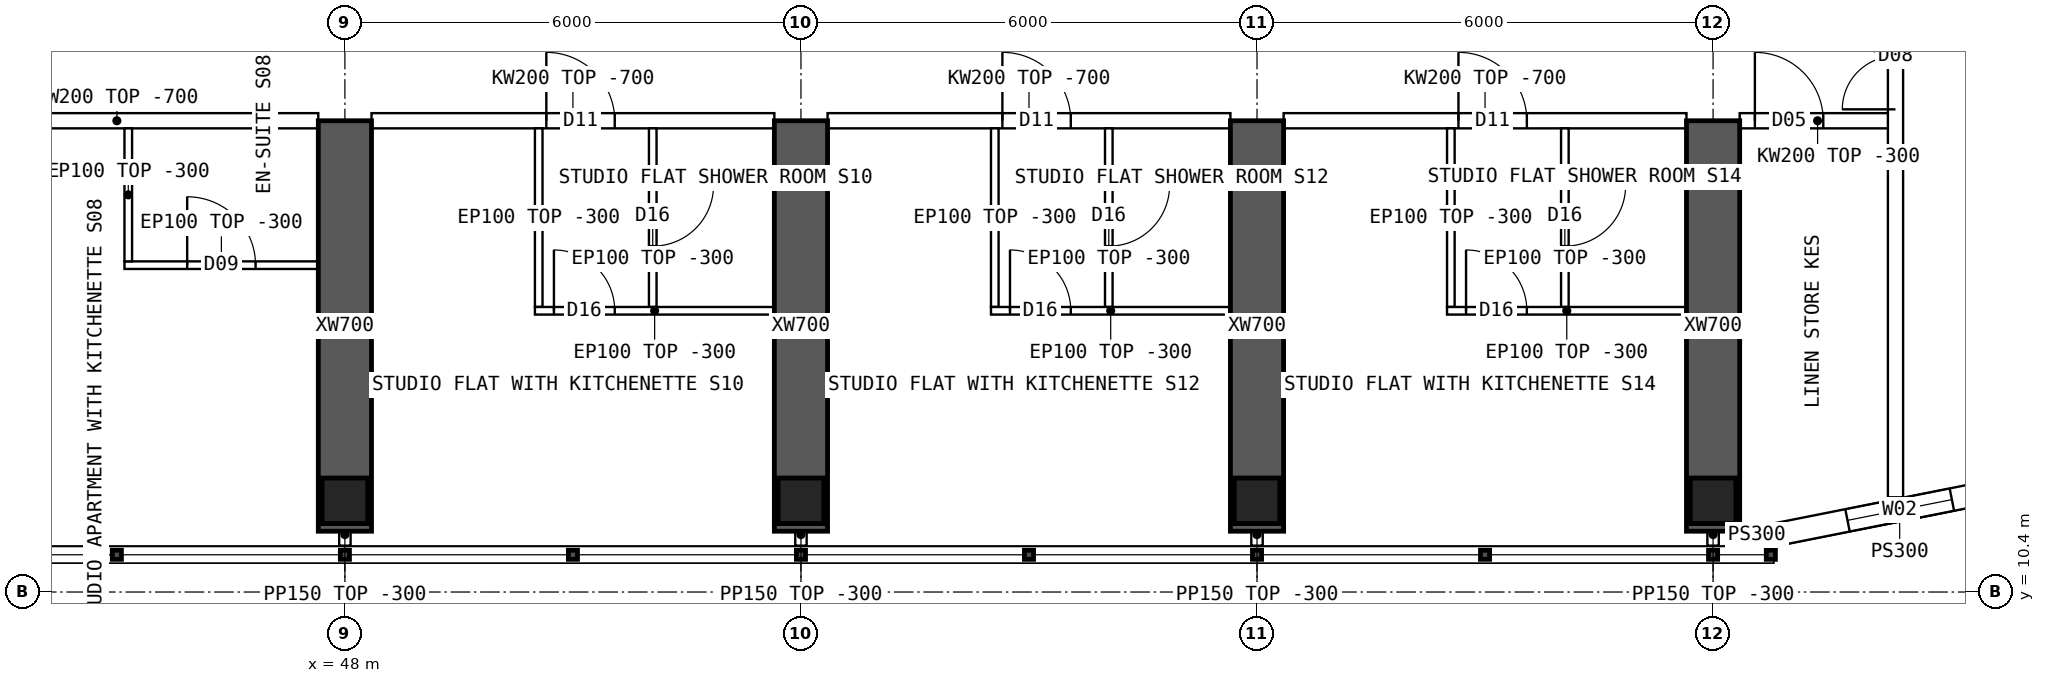
"""IFC4 building model, lengths in metres.
Left out: names, types, materials, properties, quantities, classifications, styles, units other than length and angle.
Written with IfcOpenShell. Run it as: python <this file> out.ifc"""

import sys

from ifc_helpers import new_model, si_unit, direction, frame, frame_2d, origin, origin_2d, place, context, subcontext, project, spatial, polyline, rectangle, hollow_rectangle, outline, extrude, element, fill, save


model = new_model("IFC4")
c1 = context("Model", 3, precision=1e-05, world=origin(), true_north=direction((0.0, 1.0)))
c2 = subcontext(c1, "Body", "Model", "MODEL_VIEW")
j1 = project(units=[si_unit("LENGTHUNIT", "METRE"), si_unit("PLANEANGLEUNIT", "RADIAN")], contexts=[c1])
p1 = place(None, origin())
s1 = spatial("IfcSite", under=j1, at=p1, CompositionType="ELEMENT")
p2 = place(p1, origin())
s2 = spatial("IfcBuilding", under=s1, at=p2, CompositionType="ELEMENT")
p3 = place(p2, frame((0.0, 0.0, 254.05)))
s3 = spatial("IfcBuildingStorey", under=s2, at=p3, CompositionType="ELEMENT", Elevation=254.05)
for number, where, z_axis, x_axis in (
    (1, (48.0, 11.6, 0.0), (0.0, 0.0, 1.0), (1.0, 0.0, 0.0)),
    (2, (54.0, 11.6, 0.0), (0.0, 0.0, 1.0), (1.0, 0.0, 0.0)),
    (3, (60.0, 11.6, 0.0), (0.0, 0.0, 1.0), (1.0, 0.0, 0.0)),
    (4, (66.0, 11.6, 0.0), (0.0, 0.0, 1.0), (1.0, 0.0, 0.0)),
):
    element("IfcColumn", number, at=place(p3, frame(where, z_axis=z_axis, x_axis=x_axis)), inside=s3, PredefinedType="COLUMN", context=c2, shape_type="SweptSolid", body=[
        extrude(hollow_rectangle(XDim=0.6, YDim=0.6, WallThickness=0.06, at=origin_2d()), origin(), (0.0, 0.0, 1.0), 3.75),
    ])
for number, where, z_axis, x_axis in (
    (5, (48.0, 11.2, 0.0), (0.0, 0.0, 1.0), (0.0, 1.0, 0.0)),
    (6, (54.0, 11.2, 0.0), (0.0, 0.0, 1.0), (0.0, 1.0, 0.0)),
    (7, (60.0, 11.2, 0.0), (0.0, 0.0, 1.0), (0.0, 1.0, 0.0)),
    (8, (66.0, 11.2, 0.0), (0.0, 0.0, 1.0), (0.0, 1.0, 0.0)),
):
    element("IfcWall", number, at=place(p3, frame(where, z_axis=z_axis, x_axis=x_axis)), inside=s3, PredefinedType="SHEAR", context=c2, shape_type="SweptSolid", body=[
        extrude(rectangle(XDim=5.4, YDim=0.7, at=frame_2d((2.7, 0.0))), origin(), (0.0, 0.0, 1.0), 3.75),
    ])
p4 = place(p3, frame((66.8, 11.15, 0.0), z_axis=(0.0, 0.0, 1.0), x_axis=(0.98078325777, 0.195100490205, 0.0)))
e9 = element("IfcWall", 9, at=p4, inside=s3, PredefinedType="SOLIDWALL", context=c2, shape_type="SweptSolid", body=[
    extrude(outline(polyline([(-0.03, -0.15), (3.405, -0.15), (3.345, 0.15), (0.03, 0.15), (-0.03, -0.15)])), origin(), (0.0, 0.0, 1.0), 3.45),
])
p5 = place(p4, frame((0.988, 0.0, 0.9)))
e10 = element("IfcOpeningElement", 10, at=p5, cuts=e9, PredefinedType="OPENING", context=c2, shape_type="SweptSolid", body=[
    extrude(rectangle(XDim=1.4, YDim=1.8, at=frame_2d((0.7, 0.9))), frame((0.0, 0.16, 0.0), z_axis=(0.0, -1.0, 0.0), x_axis=(1.0, 0.0, 0.0)), (0.0, 0.0, 1.0), 0.32),
])
p6 = place(p3, frame((66.8, 11.15, 0.0), z_axis=(0.0, 0.0, 1.0), x_axis=(-1.0, 0.0, 0.0)))
e11 = element("IfcWall", 11, at=p6, inside=s3, PredefinedType="SOLIDWALL", context=c2, shape_type="SweptSolid", body=[
    extrude(rectangle(XDim=0.45, YDim=0.3, at=frame_2d((0.225, 0.0))), origin(), (0.0, 0.0, 1.0), 3.45),
])
p7 = place(p3, frame((42.35, 16.6, 0.0), z_axis=(0.0, 0.0, 1.0), x_axis=(1.0, 0.0, 0.0)))
e12 = element("IfcWall", 12, at=p7, inside=s3, PredefinedType="SOLIDWALL", context=c2, shape_type="SweptSolid", body=[
    extrude(outline(polyline([(0.0, 0.0), (5.3, 0.0), (5.3, 3.05), (0.0, 3.05), (0.0, 0.0)])), frame((0.0, 0.1, 0.0), z_axis=(0.0, -1.0, 0.0), x_axis=(1.0, 0.0, 0.0)), (0.0, 0.0, 1.0), 0.2),
])
p8 = place(p7, frame((0.1, 0.0, 0.0)))
e13 = element("IfcOpeningElement", 13, at=p8, cuts=e12, PredefinedType="OPENING", context=c2, shape_type="SweptSolid", body=[
    extrude(rectangle(XDim=0.9, YDim=2.1, at=frame_2d((0.45, 1.05))), frame((0.0, 0.11, 0.0), z_axis=(0.0, -1.0, 0.0), x_axis=(1.0, 0.0, 0.0)), (0.0, 0.0, 1.0), 0.22),
])
p9 = place(p3, frame((48.35, 16.6, 0.0), z_axis=(0.0, 0.0, 1.0), x_axis=(1.0, 0.0, 0.0)))
e14 = element("IfcWall", 14, at=p9, inside=s3, PredefinedType="SOLIDWALL", context=c2, shape_type="SweptSolid", body=[
    extrude(outline(polyline([(0.0, 0.0), (5.3, 0.0), (5.3, 3.05), (0.0, 3.05), (0.0, 0.0)])), frame((0.0, 0.1, 0.0), z_axis=(0.0, -1.0, 0.0), x_axis=(1.0, 0.0, 0.0)), (0.0, 0.0, 1.0), 0.2),
])
p10 = place(p9, frame((2.3, 0.0, 0.0)))
e15 = element("IfcOpeningElement", 15, at=p10, cuts=e14, PredefinedType="OPENING", context=c2, shape_type="SweptSolid", body=[
    extrude(rectangle(XDim=0.9, YDim=2.1, at=frame_2d((0.45, 1.05))), frame((0.0, 0.11, 0.0), z_axis=(0.0, -1.0, 0.0), x_axis=(1.0, 0.0, 0.0)), (0.0, 0.0, 1.0), 0.22),
])
p11 = place(p3, frame((54.35, 16.6, 0.0), z_axis=(0.0, 0.0, 1.0), x_axis=(1.0, 0.0, 0.0)))
e16 = element("IfcWall", 16, at=p11, inside=s3, PredefinedType="SOLIDWALL", context=c2, shape_type="SweptSolid", body=[
    extrude(outline(polyline([(0.0, 0.0), (5.3, 0.0), (5.3, 3.05), (0.0, 3.05), (0.0, 0.0)])), frame((0.0, 0.1, 0.0), z_axis=(0.0, -1.0, 0.0), x_axis=(1.0, 0.0, 0.0)), (0.0, 0.0, 1.0), 0.2),
])
p12 = place(p11, frame((2.3, 0.0, 0.0)))
e17 = element("IfcOpeningElement", 17, at=p12, cuts=e16, PredefinedType="OPENING", context=c2, shape_type="SweptSolid", body=[
    extrude(rectangle(XDim=0.9, YDim=2.1, at=frame_2d((0.45, 1.05))), frame((0.0, 0.11, 0.0), z_axis=(0.0, -1.0, 0.0), x_axis=(1.0, 0.0, 0.0)), (0.0, 0.0, 1.0), 0.22),
])
p13 = place(p3, frame((60.35, 16.6, 0.0), z_axis=(0.0, 0.0, 1.0), x_axis=(1.0, 0.0, 0.0)))
e18 = element("IfcWall", 18, at=p13, inside=s3, PredefinedType="SOLIDWALL", context=c2, shape_type="SweptSolid", body=[
    extrude(outline(polyline([(0.0, 0.0), (5.3, 0.0), (5.3, 3.05), (0.0, 3.05), (0.0, 0.0)])), frame((0.0, 0.1, 0.0), z_axis=(0.0, -1.0, 0.0), x_axis=(1.0, 0.0, 0.0)), (0.0, 0.0, 1.0), 0.2),
])
p14 = place(p13, frame((2.3, 0.0, 0.0)))
e19 = element("IfcOpeningElement", 19, at=p14, cuts=e18, PredefinedType="OPENING", context=c2, shape_type="SweptSolid", body=[
    extrude(rectangle(XDim=0.9, YDim=2.1, at=frame_2d((0.45, 1.05))), frame((0.0, 0.11, 0.0), z_axis=(0.0, -1.0, 0.0), x_axis=(1.0, 0.0, 0.0)), (0.0, 0.0, 1.0), 0.22),
])
p15 = place(p3, frame((66.35, 16.6, 0.0), z_axis=(0.0, 0.0, 1.0), x_axis=(1.0, 0.0, 0.0)))
e20 = element("IfcWall", 20, at=p15, inside=s3, PredefinedType="SOLIDWALL", context=c2, shape_type="SweptSolid", body=[
    extrude(rectangle(XDim=2.05, YDim=0.2, at=frame_2d((1.025, 0.0))), origin(), (0.0, 0.0, 1.0), 3.45),
])
p16 = place(p15, frame((0.2, 0.0, 0.0)))
e21 = element("IfcOpeningElement", 21, at=p16, cuts=e20, PredefinedType="OPENING", context=c2, shape_type="SweptSolid", body=[
    extrude(rectangle(XDim=0.9, YDim=2.1, at=frame_2d((0.45, 1.05))), frame((0.0, 0.11, 0.0), z_axis=(0.0, -1.0, 0.0), x_axis=(1.0, 0.0, 0.0)), (0.0, 0.0, 1.0), 0.22),
])
p17 = place(p3, frame((47.65, 14.7, 0.0), z_axis=(0.0, 0.0, 1.0), x_axis=(-1.0, 0.0, 0.0)))
e22 = element("IfcWall", 22, at=p17, inside=s3, PredefinedType="PARTITIONING", context=c2, shape_type="SweptSolid", body=[
    extrude(rectangle(XDim=2.55, YDim=0.1, at=frame_2d((1.275, 0.0))), origin(), (0.0, 0.0, 1.0), 3.45),
])
p18 = place(p17, frame((0.825, 0.0, 0.0)))
e23 = element("IfcOpeningElement", 23, at=p18, cuts=e22, PredefinedType="OPENING", context=c2, shape_type="SweptSolid", body=[
    extrude(rectangle(XDim=0.9, YDim=2.1, at=frame_2d((0.45, 1.05))), frame((0.0, 0.06, 0.0), z_axis=(0.0, -1.0, 0.0), x_axis=(1.0, 0.0, 0.0)), (0.0, 0.0, 1.0), 0.12),
])
p19 = place(p3, frame((45.15, 14.75, 0.0), z_axis=(0.0, 0.0, 1.0), x_axis=(0.0, 1.0, 0.0)))
e24 = element("IfcWall", 24, at=p19, inside=s3, PredefinedType="PARTITIONING", context=c2, shape_type="SweptSolid", body=[
    extrude(outline(polyline([(0.0, 0.0), (1.75, 0.0), (1.75, 3.05), (1.702, 3.05), (1.7, 3.45), (0.0, 3.45), (0.0, 0.0)])), frame((0.0, 0.05, 0.0), z_axis=(0.0, -1.0, 0.0), x_axis=(1.0, 0.0, 0.0)), (0.0, 0.0, 1.0), 0.1),
])
p20 = place(p3, frame((53.65, 14.1, 0.0), z_axis=(0.0, 0.0, 1.0), x_axis=(-1.0, 0.0, 0.0)))
e25 = element("IfcWall", 25, at=p20, inside=s3, PredefinedType="PARTITIONING", context=c2, shape_type="SweptSolid", body=[
    extrude(rectangle(XDim=3.15, YDim=0.1, at=frame_2d((1.575, 0.0))), origin(), (0.0, 0.0, 1.0), 3.45),
])
p21 = place(p20, frame((2.1, 0.0, 0.0)))
e26 = element("IfcOpeningElement", 26, at=p21, cuts=e25, PredefinedType="OPENING", context=c2, shape_type="SweptSolid", body=[
    extrude(rectangle(XDim=0.8, YDim=2.1, at=frame_2d((0.4, 1.05))), frame((0.0, 0.06, 0.0), z_axis=(0.0, -1.0, 0.0), x_axis=(1.0, 0.0, 0.0)), (0.0, 0.0, 1.0), 0.12),
])
p22 = place(p3, frame((50.55, 14.15, 0.0), z_axis=(0.0, 0.0, 1.0), x_axis=(0.0, 1.0, 0.0)))
e27 = element("IfcWall", 27, at=p22, inside=s3, PredefinedType="PARTITIONING", context=c2, shape_type="SweptSolid", body=[
    extrude(outline(polyline([(0.0, 0.0), (2.35, 0.0), (2.35, 3.05), (2.302, 3.05), (2.3, 3.45), (0.0, 3.45), (0.0, 0.0)])), frame((0.0, 0.05, 0.0), z_axis=(0.0, -1.0, 0.0), x_axis=(1.0, 0.0, 0.0)), (0.0, 0.0, 1.0), 0.1),
])
p23 = place(p3, frame((52.05, 14.15, 0.0), z_axis=(0.0, 0.0, 1.0), x_axis=(0.0, 1.0, 0.0)))
e28 = element("IfcWall", 28, at=p23, inside=s3, PredefinedType="PARTITIONING", context=c2, shape_type="SweptSolid", body=[
    extrude(outline(polyline([(0.0, 0.0), (2.35, 0.0), (2.35, 3.05), (2.302, 3.05), (2.3, 3.45), (0.0, 3.45), (0.0, 0.0)])), frame((0.0, 0.05, 0.0), z_axis=(0.0, -1.0, 0.0), x_axis=(1.0, 0.0, 0.0)), (0.0, 0.0, 1.0), 0.1),
])
p24 = place(p23, frame((0.8, 0.0, 0.0)))
e29 = element("IfcOpeningElement", 29, at=p24, cuts=e28, PredefinedType="OPENING", context=c2, shape_type="SweptSolid", body=[
    extrude(rectangle(XDim=0.8, YDim=2.1, at=frame_2d((0.4, 1.05))), frame((0.0, 0.06, 0.0), z_axis=(0.0, -1.0, 0.0), x_axis=(1.0, 0.0, 0.0)), (0.0, 0.0, 1.0), 0.12),
])
p25 = place(p3, frame((59.65, 14.1, 0.0), z_axis=(0.0, 0.0, 1.0), x_axis=(-1.0, 0.0, 0.0)))
e30 = element("IfcWall", 30, at=p25, inside=s3, PredefinedType="PARTITIONING", context=c2, shape_type="SweptSolid", body=[
    extrude(rectangle(XDim=3.15, YDim=0.1, at=frame_2d((1.575, 0.0))), origin(), (0.0, 0.0, 1.0), 3.45),
])
p26 = place(p25, frame((2.1, 0.0, 0.0)))
e31 = element("IfcOpeningElement", 31, at=p26, cuts=e30, PredefinedType="OPENING", context=c2, shape_type="SweptSolid", body=[
    extrude(rectangle(XDim=0.8, YDim=2.1, at=frame_2d((0.4, 1.05))), frame((0.0, 0.06, 0.0), z_axis=(0.0, -1.0, 0.0), x_axis=(1.0, 0.0, 0.0)), (0.0, 0.0, 1.0), 0.12),
])
p27 = place(p3, frame((56.55, 14.15, 0.0), z_axis=(0.0, 0.0, 1.0), x_axis=(0.0, 1.0, 0.0)))
e32 = element("IfcWall", 32, at=p27, inside=s3, PredefinedType="PARTITIONING", context=c2, shape_type="SweptSolid", body=[
    extrude(outline(polyline([(0.0, 0.0), (2.35, 0.0), (2.35, 3.05), (2.302, 3.05), (2.3, 3.45), (0.0, 3.45), (0.0, 0.0)])), frame((0.0, 0.05, 0.0), z_axis=(0.0, -1.0, 0.0), x_axis=(1.0, 0.0, 0.0)), (0.0, 0.0, 1.0), 0.1),
])
p28 = place(p3, frame((58.05, 14.15, 0.0), z_axis=(0.0, 0.0, 1.0), x_axis=(0.0, 1.0, 0.0)))
e33 = element("IfcWall", 33, at=p28, inside=s3, PredefinedType="PARTITIONING", context=c2, shape_type="SweptSolid", body=[
    extrude(outline(polyline([(0.0, 0.0), (2.35, 0.0), (2.35, 3.05), (2.302, 3.05), (2.3, 3.45), (0.0, 3.45), (0.0, 0.0)])), frame((0.0, 0.05, 0.0), z_axis=(0.0, -1.0, 0.0), x_axis=(1.0, 0.0, 0.0)), (0.0, 0.0, 1.0), 0.1),
])
p29 = place(p28, frame((0.8, 0.0, 0.0)))
e34 = element("IfcOpeningElement", 34, at=p29, cuts=e33, PredefinedType="OPENING", context=c2, shape_type="SweptSolid", body=[
    extrude(rectangle(XDim=0.8, YDim=2.1, at=frame_2d((0.4, 1.05))), frame((0.0, 0.06, 0.0), z_axis=(0.0, -1.0, 0.0), x_axis=(1.0, 0.0, 0.0)), (0.0, 0.0, 1.0), 0.12),
])
p30 = place(p3, frame((65.65, 14.1, 0.0), z_axis=(0.0, 0.0, 1.0), x_axis=(-1.0, 0.0, 0.0)))
e35 = element("IfcWall", 35, at=p30, inside=s3, PredefinedType="PARTITIONING", context=c2, shape_type="SweptSolid", body=[
    extrude(rectangle(XDim=3.15, YDim=0.1, at=frame_2d((1.575, 0.0))), origin(), (0.0, 0.0, 1.0), 3.45),
])
p31 = place(p30, frame((2.1, 0.0, 0.0)))
e36 = element("IfcOpeningElement", 36, at=p31, cuts=e35, PredefinedType="OPENING", context=c2, shape_type="SweptSolid", body=[
    extrude(rectangle(XDim=0.8, YDim=2.1, at=frame_2d((0.4, 1.05))), frame((0.0, 0.06, 0.0), z_axis=(0.0, -1.0, 0.0), x_axis=(1.0, 0.0, 0.0)), (0.0, 0.0, 1.0), 0.12),
])
p32 = place(p3, frame((62.55, 14.15, 0.0), z_axis=(0.0, 0.0, 1.0), x_axis=(0.0, 1.0, 0.0)))
e37 = element("IfcWall", 37, at=p32, inside=s3, PredefinedType="PARTITIONING", context=c2, shape_type="SweptSolid", body=[
    extrude(outline(polyline([(0.0, 0.0), (2.35, 0.0), (2.35, 3.05), (2.302, 3.05), (2.3, 3.45), (0.0, 3.45), (0.0, 0.0)])), frame((0.0, 0.05, 0.0), z_axis=(0.0, -1.0, 0.0), x_axis=(1.0, 0.0, 0.0)), (0.0, 0.0, 1.0), 0.1),
])
p33 = place(p3, frame((64.05, 14.15, 0.0), z_axis=(0.0, 0.0, 1.0), x_axis=(0.0, 1.0, 0.0)))
e38 = element("IfcWall", 38, at=p33, inside=s3, PredefinedType="PARTITIONING", context=c2, shape_type="SweptSolid", body=[
    extrude(outline(polyline([(0.0, 0.0), (2.35, 0.0), (2.35, 3.05), (2.302, 3.05), (2.3, 3.45), (0.0, 3.45), (0.0, 0.0)])), frame((0.0, 0.05, 0.0), z_axis=(0.0, -1.0, 0.0), x_axis=(1.0, 0.0, 0.0)), (0.0, 0.0, 1.0), 0.1),
])
p34 = place(p33, frame((0.8, 0.0, 0.0)))
e39 = element("IfcOpeningElement", 39, at=p34, cuts=e38, PredefinedType="OPENING", context=c2, shape_type="SweptSolid", body=[
    extrude(rectangle(XDim=0.8, YDim=2.1, at=frame_2d((0.4, 1.05))), frame((0.0, 0.06, 0.0), z_axis=(0.0, -1.0, 0.0), x_axis=(1.0, 0.0, 0.0)), (0.0, 0.0, 1.0), 0.12),
])
p35 = place(p3, frame((68.4, 11.646, 0.0), z_axis=(0.0, 0.0, 1.0), x_axis=(0.0, 1.0, 0.0)))
e40 = element("IfcWall", 40, at=p35, inside=s3, PredefinedType="SOLIDWALL", context=c2, shape_type="SweptSolid", body=[
    extrude(rectangle(XDim=40.708, YDim=0.2, at=frame_2d((20.354, 0.0))), origin(), (0.0, 0.0, 1.0), 3.45),
])
p36 = place(p35, frame((5.104, 0.0, 0.0)))
e41 = element("IfcOpeningElement", 41, at=p36, cuts=e40, PredefinedType="OPENING", context=c2, shape_type="SweptSolid", body=[
    extrude(rectangle(XDim=1.4, YDim=2.1, at=frame_2d((0.7, 1.05))), frame((0.0, 0.11, 0.0), z_axis=(0.0, -1.0, 0.0), x_axis=(1.0, 0.0, 0.0)), (0.0, 0.0, 1.0), 0.22),
])
p37 = place(p35, frame((34.104, 0.0, 0.0)))
e42 = element("IfcOpeningElement", 42, at=p37, cuts=e40, PredefinedType="OPENING", context=c2, shape_type="SweptSolid", body=[
    extrude(rectangle(XDim=1.4, YDim=2.1, at=frame_2d((0.7, 1.05))), frame((0.0, 0.11, 0.0), z_axis=(0.0, -1.0, 0.0), x_axis=(1.0, 0.0, 0.0)), (0.0, 0.0, 1.0), 0.22),
])
for number, where, z_axis, x_axis in (
    (43, (48.0, 11.3, 0.0), (0.0, 0.0, 1.0), (0.0, -1.0, 0.0)),
    (44, (54.0, 11.3, 0.0), (0.0, 0.0, 1.0), (0.0, -1.0, 0.0)),
    (45, (60.0, 11.3, 0.0), (0.0, 0.0, 1.0), (0.0, -1.0, 0.0)),
    (46, (66.0, 11.3, 0.0), (0.0, 0.0, 1.0), (0.0, -1.0, 0.0)),
):
    element("IfcWall", number, at=place(p3, frame(where, z_axis=z_axis, x_axis=x_axis)), inside=s3, PredefinedType="PARTITIONING", context=c2, shape_type="SweptSolid", body=[
        extrude(rectangle(XDim=0.29, YDim=0.15, at=frame_2d((0.145, 0.0))), origin(), (0.0, 0.0, 1.0), 3.45),
    ])
p38 = place(p5, origin())
e47 = element("IfcWindow", 47, at=p38, inside=s3, PartitioningType="SINGLE_PANEL", PredefinedType="WINDOW", context=c2, shape_type="SweptSolid", body=[
    extrude(rectangle(XDim=1.4, YDim=1.8, at=frame_2d((0.7, 0.9))), frame((0.0, 0.03, 0.0), z_axis=(0.0, -1.0, 0.0), x_axis=(1.0, 0.0, 0.0)), (0.0, 0.0, 1.0), 0.06),
])
fill(e10, e47)
p39 = place(p18, origin())
e48 = element("IfcDoor", 48, at=p39, inside=s3, OperationType="SINGLE_SWING_RIGHT", PredefinedType="DOOR", context=c2, shape_type="SweptSolid", body=[
    extrude(rectangle(XDim=0.9, YDim=2.1, at=frame_2d((0.45, 1.05))), frame((0.0, 0.025, 0.0), z_axis=(0.0, -1.0, 0.0), x_axis=(1.0, 0.0, 0.0)), (0.0, 0.0, 1.0), 0.05),
])
fill(e23, e48)
p40 = place(p21, origin())
e49 = element("IfcDoor", 49, at=p40, inside=s3, OperationType="SINGLE_SWING_RIGHT", PredefinedType="DOOR", context=c2, shape_type="SweptSolid", body=[
    extrude(rectangle(XDim=0.8, YDim=2.1, at=frame_2d((0.4, 1.05))), frame((0.0, 0.025, 0.0), z_axis=(0.0, -1.0, 0.0), x_axis=(1.0, 0.0, 0.0)), (0.0, 0.0, 1.0), 0.05),
])
fill(e26, e49)
p41 = place(p24, origin())
e50 = element("IfcDoor", 50, at=p41, inside=s3, OperationType="SINGLE_SWING_RIGHT", PredefinedType="DOOR", context=c2, shape_type="SweptSolid", body=[
    extrude(rectangle(XDim=0.8, YDim=2.1, at=frame_2d((0.4, 1.05))), frame((0.0, 0.025, 0.0), z_axis=(0.0, -1.0, 0.0), x_axis=(1.0, 0.0, 0.0)), (0.0, 0.0, 1.0), 0.05),
])
fill(e29, e50)
p42 = place(p10, origin())
e51 = element("IfcDoor", 51, at=p42, inside=s3, OperationType="SINGLE_SWING_LEFT", PredefinedType="DOOR", context=c2, shape_type="SweptSolid", body=[
    extrude(rectangle(XDim=0.9, YDim=2.1, at=frame_2d((0.45, 1.05))), frame((0.0, 0.025, 0.0), z_axis=(0.0, -1.0, 0.0), x_axis=(1.0, 0.0, 0.0)), (0.0, 0.0, 1.0), 0.05),
])
fill(e15, e51)
p43 = place(p26, origin())
e52 = element("IfcDoor", 52, at=p43, inside=s3, OperationType="SINGLE_SWING_RIGHT", PredefinedType="DOOR", context=c2, shape_type="SweptSolid", body=[
    extrude(rectangle(XDim=0.8, YDim=2.1, at=frame_2d((0.4, 1.05))), frame((0.0, 0.025, 0.0), z_axis=(0.0, -1.0, 0.0), x_axis=(1.0, 0.0, 0.0)), (0.0, 0.0, 1.0), 0.05),
])
fill(e31, e52)
p44 = place(p29, origin())
e53 = element("IfcDoor", 53, at=p44, inside=s3, OperationType="SINGLE_SWING_RIGHT", PredefinedType="DOOR", context=c2, shape_type="SweptSolid", body=[
    extrude(rectangle(XDim=0.8, YDim=2.1, at=frame_2d((0.4, 1.05))), frame((0.0, 0.025, 0.0), z_axis=(0.0, -1.0, 0.0), x_axis=(1.0, 0.0, 0.0)), (0.0, 0.0, 1.0), 0.05),
])
fill(e34, e53)
p45 = place(p12, origin())
e54 = element("IfcDoor", 54, at=p45, inside=s3, OperationType="SINGLE_SWING_LEFT", PredefinedType="DOOR", context=c2, shape_type="SweptSolid", body=[
    extrude(rectangle(XDim=0.9, YDim=2.1, at=frame_2d((0.45, 1.05))), frame((0.0, 0.025, 0.0), z_axis=(0.0, -1.0, 0.0), x_axis=(1.0, 0.0, 0.0)), (0.0, 0.0, 1.0), 0.05),
])
fill(e17, e54)
p46 = place(p31, origin())
e55 = element("IfcDoor", 55, at=p46, inside=s3, OperationType="SINGLE_SWING_RIGHT", PredefinedType="DOOR", context=c2, shape_type="SweptSolid", body=[
    extrude(rectangle(XDim=0.8, YDim=2.1, at=frame_2d((0.4, 1.05))), frame((0.0, 0.025, 0.0), z_axis=(0.0, -1.0, 0.0), x_axis=(1.0, 0.0, 0.0)), (0.0, 0.0, 1.0), 0.05),
])
fill(e36, e55)
p47 = place(p34, origin())
e56 = element("IfcDoor", 56, at=p47, inside=s3, OperationType="SINGLE_SWING_RIGHT", PredefinedType="DOOR", context=c2, shape_type="SweptSolid", body=[
    extrude(rectangle(XDim=0.8, YDim=2.1, at=frame_2d((0.4, 1.05))), frame((0.0, 0.025, 0.0), z_axis=(0.0, -1.0, 0.0), x_axis=(1.0, 0.0, 0.0)), (0.0, 0.0, 1.0), 0.05),
])
fill(e39, e56)
p48 = place(p14, origin())
e57 = element("IfcDoor", 57, at=p48, inside=s3, OperationType="SINGLE_SWING_LEFT", PredefinedType="DOOR", context=c2, shape_type="SweptSolid", body=[
    extrude(rectangle(XDim=0.9, YDim=2.1, at=frame_2d((0.45, 1.05))), frame((0.0, 0.025, 0.0), z_axis=(0.0, -1.0, 0.0), x_axis=(1.0, 0.0, 0.0)), (0.0, 0.0, 1.0), 0.05),
])
fill(e19, e57)
p49 = place(p36, origin())
e58 = element("IfcDoor", 58, at=p49, inside=s3, OperationType="DOUBLE_DOOR_SINGLE_SWING", PredefinedType="DOOR", context=c2, shape_type="SweptSolid", body=[
    extrude(rectangle(XDim=1.4, YDim=2.1, at=frame_2d((0.7, 1.05))), frame((0.0, 0.025, 0.0), z_axis=(0.0, -1.0, 0.0), x_axis=(1.0, 0.0, 0.0)), (0.0, 0.0, 1.0), 0.05),
])
fill(e41, e58)
p50 = place(p16, origin())
e59 = element("IfcDoor", 59, at=p50, inside=s3, OperationType="SINGLE_SWING_LEFT", PredefinedType="DOOR", context=c2, shape_type="SweptSolid", body=[
    extrude(rectangle(XDim=0.9, YDim=2.1, at=frame_2d((0.45, 1.05))), frame((0.0, 0.025, 0.0), z_axis=(0.0, -1.0, 0.0), x_axis=(1.0, 0.0, 0.0)), (0.0, 0.0, 1.0), 0.05),
])
fill(e21, e59)
save(model, sys.argv[1])
